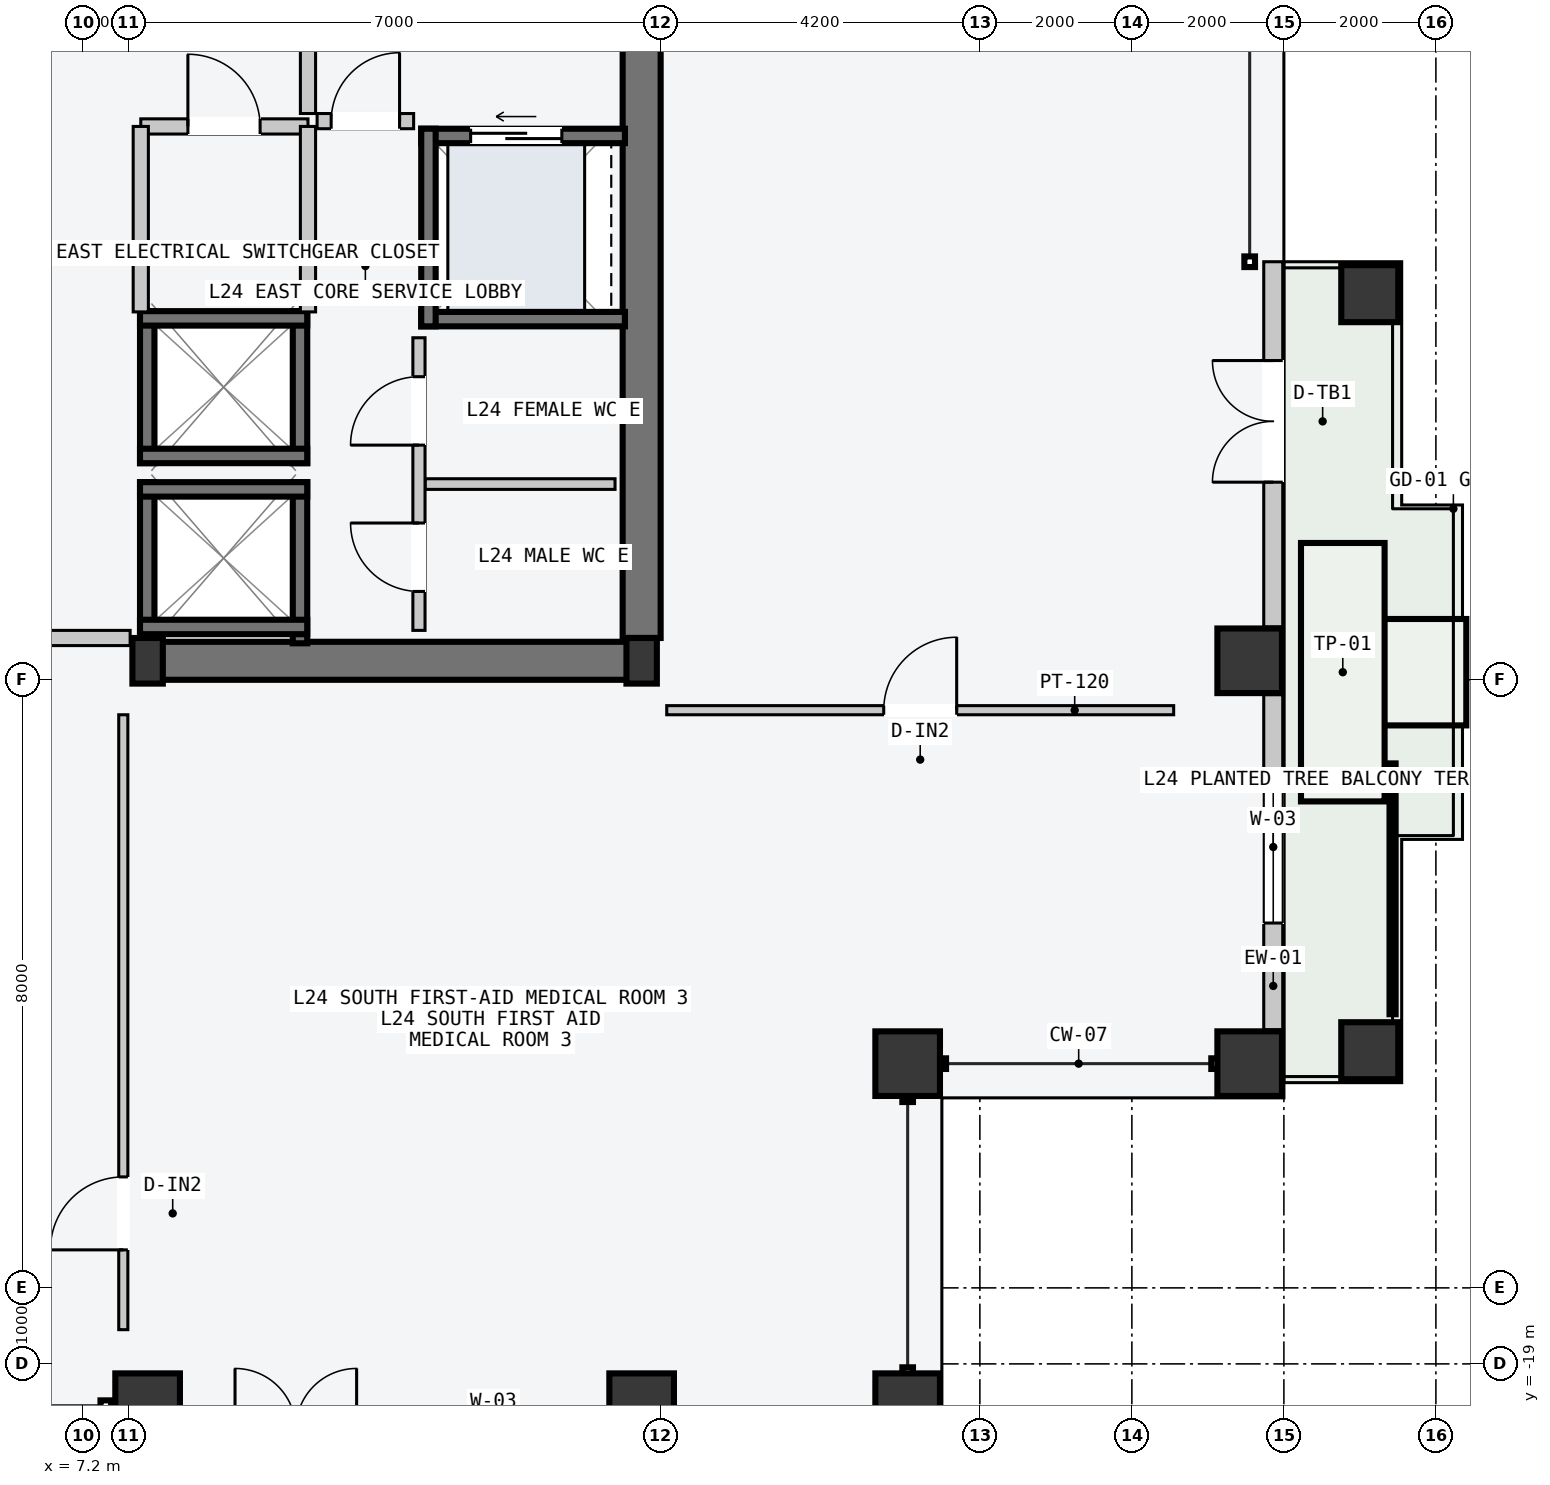
"""IFC4 building model, lengths in metres.
Left out: names, types, materials, properties, quantities, classifications, styles, units other than length and angle.
Written with IfcOpenShell. Run it as: python <this file> out.ifc"""

import sys

from ifc_helpers import new_model, si_unit, direction, frame, frame_2d, origin, origin_2d, place, context, subcontext, project, spatial, rectangle, hollow_rectangle, i_section, extrude, element, fill, save


model = new_model("IFC4")
c1 = context("Model", 3, precision=1e-05, world=origin(), true_north=direction((0.0, 1.0)))
c2 = subcontext(c1, "Body", "Model", "MODEL_VIEW")
j1 = project(units=[si_unit("LENGTHUNIT", "METRE"), si_unit("PLANEANGLEUNIT", "RADIAN")], contexts=[c1])
p1 = place(None, origin())
s1 = spatial("IfcSite", under=j1, at=p1, CompositionType="ELEMENT")
p2 = place(p1, origin())
s2 = spatial("IfcBuilding", under=s1, at=p2, CompositionType="ELEMENT")
p3 = place(p2, frame((0.0, 0.0, 95.4)))
s3 = spatial("IfcBuildingStorey", under=s2, at=p3, CompositionType="ELEMENT", Elevation=95.4)
p4 = place(p3, frame((8.07, -9.75, -0.2), z_axis=(0.0, 0.0, 1.0), x_axis=(1.0, 0.0, 0.0)))
e1 = element("IfcWall", 1, at=p4, inside=s3, PredefinedType="SHEAR", context=c2, shape_type="SweptSolid", body=[
    extrude(rectangle(XDim=6.46, YDim=0.5, at=frame_2d((3.23, 0.0))), origin(), (0.0, 0.0, 1.0), 3.6),
])
p5 = place(p3, frame((14.55, -9.45, -0.2), z_axis=(0.0, 0.0, 1.0), x_axis=(0.0, 1.0, 0.0)))
e2 = element("IfcWall", 2, at=p5, inside=s3, PredefinedType="SHEAR", context=c2, shape_type="SweptSolid", body=[
    extrude(rectangle(XDim=9.15, YDim=0.5, at=frame_2d((4.575, 0.0))), origin(), (0.0, 0.0, 1.0), 3.6),
])
for number, where, z_axis, x_axis in (
    (3, (8.05, -9.75, 0.0), (0.0, 0.0, 1.0), (1.0, 0.0, 0.0)),
    (4, (14.55, -9.75, 0.0), (0.0, 0.0, 1.0), (1.0, 0.0, 0.0)),
):
    element("IfcColumn", number, at=place(p3, frame(where, z_axis=z_axis, x_axis=x_axis)), inside=s3, PredefinedType="COLUMN", context=c2, shape_type="SweptSolid", body=[
        extrude(i_section(OverallWidth=0.4, OverallDepth=0.6, WebThickness=0.022, FlangeThickness=0.036, at=origin_2d()), origin(), (0.0, 0.0, 1.0), 3.6),
    ])
for number, where, z_axis, x_axis in (
    (5, (8.05, -19.55, 0.0), (0.0, 0.0, 1.0), (1.0, 0.0, 0.0)),
    (6, (14.55, -19.55, 0.0), (0.0, 0.0, 1.0), (1.0, 0.0, 0.0)),
    (7, (18.05, -19.55, 0.0), (0.0, 0.0, 1.0), (1.0, 0.0, 0.0)),
    (8, (22.55, -15.05, 0.0), (0.0, 0.0, 1.0), (0.0, 1.0, 0.0)),
    (9, (22.55, -9.75, 0.0), (0.0, 0.0, 1.0), (0.0, 1.0, 0.0)),
    (10, (18.05, -15.05, 0.0), (0.0, 0.0, 1.0), (1.0, 0.0, 0.0)),
):
    element("IfcColumn", number, at=place(p3, frame(where, z_axis=z_axis, x_axis=x_axis)), inside=s3, PredefinedType="COLUMN", context=c2, shape_type="SweptSolid", body=[
        extrude(hollow_rectangle(XDim=0.85, YDim=0.85, WallThickness=0.04, at=origin_2d()), origin(), (0.0, 0.0, 1.0), 3.6),
    ])
for number, where, z_axis, x_axis in (
    (11, (24.13, -14.88, -0.2), (0.0, 0.0, 1.0), (0.0, 1.0, 0.0)),
    (12, (24.13, -4.92, -0.2), (0.0, 0.0, 1.0), (0.0, 1.0, 0.0)),
):
    element("IfcColumn", number, at=place(p3, frame(where, z_axis=z_axis, x_axis=x_axis)), inside=s3, PredefinedType="COLUMN", context=c2, shape_type="SweptSolid", body=[
        extrude(hollow_rectangle(XDim=0.75, YDim=0.75, WallThickness=0.032, at=origin_2d()), origin(), (0.0, 0.0, 1.0), 3.8),
    ])
p6 = place(p3, frame((22.86, -14.605, 0.0), z_axis=(0.0, 0.0, 1.0), x_axis=(0.0, 1.0, 0.0)))
e13 = element("IfcWall", 13, at=p6, inside=s3, PredefinedType="STANDARD", context=c2, shape_type="SweptSolid", body=[
    extrude(rectangle(XDim=4.41, YDim=0.25, at=frame_2d((2.205, 0.0))), origin(), (0.0, 0.0, 1.0), 3.4),
])
p7 = place(p6, frame((1.405, 0.0, 0.85)))
e14 = element("IfcOpeningElement", 14, at=p7, cuts=e13, PredefinedType="OPENING", context=c2, shape_type="SweptSolid", body=[
    extrude(rectangle(XDim=2.0, YDim=2.1, at=frame_2d((1.0, 1.05))), frame((0.0, 0.135, 0.0), z_axis=(0.0, -1.0, 0.0), x_axis=(1.0, 0.0, 0.0)), (0.0, 0.0, 1.0), 0.27),
])
p8 = place(p3, frame((22.86, -9.305, 0.0), z_axis=(0.0, 0.0, 1.0), x_axis=(0.0, 1.0, 0.0)))
e15 = element("IfcWall", 15, at=p8, inside=s3, PredefinedType="STANDARD", context=c2, shape_type="SweptSolid", body=[
    extrude(rectangle(XDim=4.805, YDim=0.25, at=frame_2d((2.402, 0.0))), origin(), (0.0, 0.0, 1.0), 3.4),
])
p9 = place(p8, frame((1.905, 0.0, 0.0)))
e16 = element("IfcOpeningElement", 16, at=p9, cuts=e15, PredefinedType="OPENING", context=c2, shape_type="SweptSolid", body=[
    extrude(rectangle(XDim=1.6, YDim=2.2, at=frame_2d((0.8, 1.1))), frame((0.0, 0.135, 0.0), z_axis=(0.0, -1.0, 0.0), x_axis=(1.0, 0.0, 0.0)), (0.0, 0.0, 1.0), 0.27),
])
for number, where, z_axis, x_axis in (
    (17, (8.045, -9.52, -0.2), (0.0, 0.0, 1.0), (0.0, 1.0, 0.0)),
    (18, (10.055, -9.52, -0.2), (0.0, 0.0, 1.0), (0.0, 1.0, 0.0)),
):
    element("IfcWall", number, at=place(p3, frame(where, z_axis=z_axis, x_axis=x_axis)), inside=s3, PredefinedType="SOLIDWALL", context=c2, shape_type="SweptSolid", body=[
        extrude(rectangle(XDim=2.12, YDim=0.19, at=frame_2d((1.06, 0.0))), origin(), (0.0, 0.0, 1.0), 3.6),
    ])
for number, where, z_axis, x_axis in (
    (19, (7.95, -7.495, -0.2), (0.0, 0.0, 1.0), (1.0, 0.0, 0.0)),
    (20, (7.95, -9.305, -0.2), (0.0, 0.0, 1.0), (1.0, 0.0, 0.0)),
):
    element("IfcWall", number, at=place(p3, frame(where, z_axis=z_axis, x_axis=x_axis)), inside=s3, PredefinedType="SOLIDWALL", context=c2, shape_type="SweptSolid", body=[
        extrude(rectangle(XDim=2.2, YDim=0.19, at=frame_2d((1.1, 0.0))), origin(), (0.0, 0.0, 1.0), 3.6),
    ])
for number, where, z_axis, x_axis in (
    (21, (8.045, -7.15, -0.2), (0.0, 0.0, 1.0), (0.0, 1.0, 0.0)),
    (22, (10.055, -7.15, -0.2), (0.0, 0.0, 1.0), (0.0, 1.0, 0.0)),
):
    element("IfcWall", number, at=place(p3, frame(where, z_axis=z_axis, x_axis=x_axis)), inside=s3, PredefinedType="SOLIDWALL", context=c2, shape_type="SweptSolid", body=[
        extrude(rectangle(XDim=2.0, YDim=0.19, at=frame_2d((1.0, 0.0))), origin(), (0.0, 0.0, 1.0), 3.6),
    ])
for number, where, z_axis, x_axis in (
    (23, (7.95, -5.245, -0.2), (0.0, 0.0, 1.0), (1.0, 0.0, 0.0)),
    (24, (7.95, -7.055, -0.2), (0.0, 0.0, 1.0), (1.0, 0.0, 0.0)),
):
    element("IfcWall", number, at=place(p3, frame(where, z_axis=z_axis, x_axis=x_axis)), inside=s3, PredefinedType="SOLIDWALL", context=c2, shape_type="SweptSolid", body=[
        extrude(rectangle(XDim=2.2, YDim=0.19, at=frame_2d((1.1, 0.0))), origin(), (0.0, 0.0, 1.0), 3.6),
    ])
p10 = place(p3, frame((11.65, -2.845, -0.2), z_axis=(0.0, 0.0, 1.0), x_axis=(1.0, 0.0, 0.0)))
e25 = element("IfcWall", 25, at=p10, inside=s3, PredefinedType="SOLIDWALL", context=c2, shape_type="SweptSolid", body=[
    extrude(rectangle(XDim=2.68, YDim=0.19, at=frame_2d((1.34, 0.0))), origin(), (0.0, 0.0, 1.0), 3.6),
])
p11 = place(p10, frame((0.65, 0.0, 0.2)))
e26 = element("IfcOpeningElement", 26, at=p11, cuts=e25, PredefinedType="OPENING", context=c2, shape_type="SweptSolid", body=[
    extrude(rectangle(XDim=1.2, YDim=2.2, at=frame_2d((0.6, 1.1))), frame((0.0, 0.105, 0.0), z_axis=(0.0, -1.0, 0.0), x_axis=(1.0, 0.0, 0.0)), (0.0, 0.0, 1.0), 0.21),
])
p12 = place(p3, frame((11.65, -5.255, -0.2), z_axis=(0.0, 0.0, 1.0), x_axis=(1.0, 0.0, 0.0)))
e27 = element("IfcWall", 27, at=p12, inside=s3, PredefinedType="SOLIDWALL", context=c2, shape_type="SweptSolid", body=[
    extrude(rectangle(XDim=2.68, YDim=0.19, at=frame_2d((1.34, 0.0))), origin(), (0.0, 0.0, 1.0), 3.6),
])
p13 = place(p3, frame((11.745, -5.35, -0.2), z_axis=(0.0, 0.0, 1.0), x_axis=(0.0, 1.0, 0.0)))
e28 = element("IfcWall", 28, at=p13, inside=s3, PredefinedType="SOLIDWALL", context=c2, shape_type="SweptSolid", body=[
    extrude(rectangle(XDim=2.6, YDim=0.19, at=frame_2d((1.3, 0.0))), origin(), (0.0, 0.0, 1.0), 3.6),
])
p14 = place(p3, frame((6.02, -9.45, 0.0), z_axis=(0.0, 0.0, 1.0), x_axis=(1.0, 0.0, 0.0)))
e29 = element("IfcWall", 29, at=p14, inside=s3, PredefinedType="PARTITIONING", context=c2, shape_type="SweptSolid", body=[
    extrude(rectangle(XDim=1.8, YDim=0.2, at=frame_2d((0.9, 0.0))), origin(), (0.0, 0.0, 1.0), 3.4),
])
p15 = place(p3, frame((10.16, -2.55, 0.0), z_axis=(0.0, 0.0, 1.0), x_axis=(0.0, 1.0, 0.0)))
e30 = element("IfcWall", 30, at=p15, inside=s3, PredefinedType="PARTITIONING", context=c2, shape_type="SweptSolid", body=[
    extrude(rectangle(XDim=3.4, YDim=0.2, at=frame_2d((1.7, 0.0))), origin(), (0.0, 0.0, 1.0), 3.4),
])
p16 = place(p15, frame((1.3, 0.0, 0.0)))
e31 = element("IfcOpeningElement", 31, at=p16, cuts=e30, PredefinedType="OPENING", context=c2, shape_type="SweptSolid", body=[
    extrude(rectangle(XDim=1.1, YDim=2.15, at=frame_2d((0.55, 1.075))), frame((0.0, 0.11, 0.0), z_axis=(0.0, -1.0, 0.0), x_axis=(1.0, 0.0, 0.0)), (0.0, 0.0, 1.0), 0.22),
])
p17 = place(p3, frame((10.28, -2.65, 0.0), z_axis=(0.0, 0.0, 1.0), x_axis=(1.0, 0.0, 0.0)))
e32 = element("IfcWall", 32, at=p17, inside=s3, PredefinedType="PARTITIONING", context=c2, shape_type="SweptSolid", body=[
    extrude(rectangle(XDim=1.27, YDim=0.2, at=frame_2d((0.635, 0.0))), origin(), (0.0, 0.0, 1.0), 3.4),
])
p18 = place(p17, frame((0.185, 0.0, 0.0)))
e33 = element("IfcOpeningElement", 33, at=p18, cuts=e32, PredefinedType="OPENING", context=c2, shape_type="SweptSolid", body=[
    extrude(rectangle(XDim=0.9, YDim=2.15, at=frame_2d((0.45, 1.075))), frame((0.0, 0.11, 0.0), z_axis=(0.0, -1.0, 0.0), x_axis=(1.0, 0.0, 0.0)), (0.0, 0.0, 1.0), 0.22),
])
p19 = place(p3, frame((7.96, -2.72, 0.0), z_axis=(0.0, 0.0, 1.0), x_axis=(1.0, 0.0, 0.0)))
e34 = element("IfcWall", 34, at=p19, inside=s3, PredefinedType="PARTITIONING", context=c2, shape_type="SweptSolid", body=[
    extrude(rectangle(XDim=2.2, YDim=0.2, at=frame_2d((1.1, 0.0))), origin(), (0.0, 0.0, 1.0), 3.4),
])
p20 = place(p19, frame((0.62, 0.0, 0.0)))
e35 = element("IfcOpeningElement", 35, at=p20, cuts=e34, PredefinedType="OPENING", context=c2, shape_type="SweptSolid", body=[
    extrude(rectangle(XDim=0.95, YDim=2.1, at=frame_2d((0.475, 1.05))), frame((0.0, 0.11, 0.0), z_axis=(0.0, -1.0, 0.0), x_axis=(1.0, 0.0, 0.0)), (0.0, 0.0, 1.0), 0.22),
])
for number, where, z_axis, x_axis in (
    (36, (7.96, -5.16, 0.0), (0.0, 0.0, 1.0), (0.0, 1.0, 0.0)),
    (37, (10.16, -5.16, 0.0), (0.0, 0.0, 1.0), (0.0, 1.0, 0.0)),
):
    element("IfcWall", number, at=place(p3, frame(where, z_axis=z_axis, x_axis=x_axis)), inside=s3, PredefinedType="PARTITIONING", context=c2, shape_type="SweptSolid", body=[
        extrude(rectangle(XDim=2.44, YDim=0.2, at=frame_2d((1.22, 0.0))), origin(), (0.0, 0.0, 1.0), 3.4),
    ])
p21 = place(p3, frame((11.7, -7.425, 0.0), z_axis=(0.0, 0.0, 1.0), x_axis=(1.0, 0.0, 0.0)))
e38 = element("IfcWall", 38, at=p21, inside=s3, PredefinedType="PARTITIONING", context=c2, shape_type="SweptSolid", body=[
    extrude(rectangle(XDim=2.5, YDim=0.14, at=frame_2d((1.25, 0.0))), origin(), (0.0, 0.0, 1.0), 3.4),
])
p22 = place(p3, frame((11.62, -9.35, 0.0), z_axis=(0.0, 0.0, 1.0), x_axis=(0.0, 1.0, 0.0)))
e39 = element("IfcWall", 39, at=p22, inside=s3, PredefinedType="PARTITIONING", context=c2, shape_type="SweptSolid", body=[
    extrude(rectangle(XDim=3.85, YDim=0.16, at=frame_2d((1.925, 0.0))), origin(), (0.0, 0.0, 1.0), 3.4),
])
p23 = place(p22, frame((0.512, 0.0, 0.0)))
e40 = element("IfcOpeningElement", 40, at=p23, cuts=e39, PredefinedType="OPENING", context=c2, shape_type="SweptSolid", body=[
    extrude(rectangle(XDim=0.9, YDim=2.15, at=frame_2d((0.45, 1.075))), frame((0.0, 0.09, 0.0), z_axis=(0.0, -1.0, 0.0), x_axis=(1.0, 0.0, 0.0)), (0.0, 0.0, 1.0), 0.18),
])
p24 = place(p22, frame((2.438, 0.0, 0.0)))
e41 = element("IfcOpeningElement", 41, at=p24, cuts=e39, PredefinedType="OPENING", context=c2, shape_type="SweptSolid", body=[
    extrude(rectangle(XDim=0.9, YDim=2.15, at=frame_2d((0.45, 1.075))), frame((0.0, 0.09, 0.0), z_axis=(0.0, -1.0, 0.0), x_axis=(1.0, 0.0, 0.0)), (0.0, 0.0, 1.0), 0.18),
])
p25 = place(p3, frame((7.73, -18.55, 0.0), z_axis=(0.0, 0.0, 1.0), x_axis=(0.0, 1.0, 0.0)))
e42 = element("IfcWall", 42, at=p25, inside=s3, PredefinedType="PARTITIONING", context=c2, shape_type="SweptSolid", body=[
    extrude(rectangle(XDim=8.09, YDim=0.12, at=frame_2d((4.045, 0.0))), origin(), (0.0, 0.0, 1.0), 3.4),
])
p26 = place(p25, frame((1.05, 0.0, 0.0)))
e43 = element("IfcOpeningElement", 43, at=p26, cuts=e42, PredefinedType="OPENING", context=c2, shape_type="SweptSolid", body=[
    extrude(rectangle(XDim=0.96, YDim=2.18, at=frame_2d((0.48, 1.09))), frame((0.0, 0.07, 0.0), z_axis=(0.0, -1.0, 0.0), x_axis=(1.0, 0.0, 0.0)), (0.0, 0.0, 1.0), 0.14),
])
p27 = place(p3, frame((14.88, -10.4, 0.0), z_axis=(0.0, 0.0, 1.0), x_axis=(1.0, 0.0, 0.0)))
e44 = element("IfcWall", 44, at=p27, inside=s3, PredefinedType="PARTITIONING", context=c2, shape_type="SweptSolid", body=[
    extrude(rectangle(XDim=6.67, YDim=0.12, at=frame_2d((3.335, 0.0))), origin(), (0.0, 0.0, 1.0), 3.4),
])
p28 = place(p27, frame((2.855, 0.0, 0.0)))
e45 = element("IfcOpeningElement", 45, at=p28, cuts=e44, PredefinedType="OPENING", context=c2, shape_type="SweptSolid", body=[
    extrude(rectangle(XDim=0.96, YDim=2.18, at=frame_2d((0.48, 1.09))), frame((0.0, 0.07, 0.0), z_axis=(0.0, -1.0, 0.0), x_axis=(1.0, 0.0, 0.0)), (0.0, 0.0, 1.0), 0.14),
])
p29 = place(p7, origin())
e46 = element("IfcWindow", 46, at=p29, inside=s3, PartitioningType="SINGLE_PANEL", PredefinedType="WINDOW", context=c2, shape_type="SweptSolid", body=[
    extrude(rectangle(XDim=2.0, YDim=2.1, at=frame_2d((1.0, 1.05))), frame((0.0, 0.03, 0.0), z_axis=(0.0, -1.0, 0.0), x_axis=(1.0, 0.0, 0.0)), (0.0, 0.0, 1.0), 0.06),
])
fill(e14, e46)
p30 = place(p9, origin())
e47 = element("IfcDoor", 47, at=p30, inside=s3, OperationType="DOUBLE_DOOR_SINGLE_SWING", PredefinedType="DOOR", context=c2, shape_type="SweptSolid", body=[
    extrude(rectangle(XDim=1.6, YDim=2.2, at=frame_2d((0.8, 1.1))), frame((0.0, 0.025, 0.0), z_axis=(0.0, -1.0, 0.0), x_axis=(1.0, 0.0, 0.0)), (0.0, 0.0, 1.0), 0.05),
])
fill(e16, e47)
p31 = place(p11, origin())
e48 = element("IfcDoor", 48, at=p31, inside=s3, OperationType="SLIDING_TO_LEFT", PredefinedType="DOOR", context=c2, shape_type="SweptSolid", body=[
    extrude(rectangle(XDim=1.2, YDim=2.2, at=frame_2d((0.6, 1.1))), frame((0.0, 0.025, 0.0), z_axis=(0.0, -1.0, 0.0), x_axis=(1.0, 0.0, 0.0)), (0.0, 0.0, 1.0), 0.05),
])
fill(e26, e48)
p32 = place(p18, origin())
e49 = element("IfcDoor", 49, at=p32, inside=s3, OperationType="SINGLE_SWING_RIGHT", PredefinedType="DOOR", context=c2, shape_type="SweptSolid", body=[
    extrude(rectangle(XDim=0.9, YDim=2.15, at=frame_2d((0.45, 1.075))), frame((0.0, 0.025, 0.0), z_axis=(0.0, -1.0, 0.0), x_axis=(1.0, 0.0, 0.0)), (0.0, 0.0, 1.0), 0.05),
])
fill(e33, e49)
p33 = place(p20, origin())
e50 = element("IfcDoor", 50, at=p33, inside=s3, OperationType="SINGLE_SWING_LEFT", PredefinedType="DOOR", context=c2, shape_type="SweptSolid", body=[
    extrude(rectangle(XDim=0.95, YDim=2.1, at=frame_2d((0.475, 1.05))), frame((0.0, 0.025, 0.0), z_axis=(0.0, -1.0, 0.0), x_axis=(1.0, 0.0, 0.0)), (0.0, 0.0, 1.0), 0.05),
])
fill(e35, e50)
p34 = place(p23, origin())
e51 = element("IfcDoor", 51, at=p34, inside=s3, OperationType="SINGLE_SWING_RIGHT", PredefinedType="DOOR", context=c2, shape_type="SweptSolid", body=[
    extrude(rectangle(XDim=0.9, YDim=2.15, at=frame_2d((0.45, 1.075))), frame((0.0, 0.025, 0.0), z_axis=(0.0, -1.0, 0.0), x_axis=(1.0, 0.0, 0.0)), (0.0, 0.0, 1.0), 0.05),
])
fill(e40, e51)
p35 = place(p24, origin())
e52 = element("IfcDoor", 52, at=p35, inside=s3, OperationType="SINGLE_SWING_LEFT", PredefinedType="DOOR", context=c2, shape_type="SweptSolid", body=[
    extrude(rectangle(XDim=0.9, YDim=2.15, at=frame_2d((0.45, 1.075))), frame((0.0, 0.025, 0.0), z_axis=(0.0, -1.0, 0.0), x_axis=(1.0, 0.0, 0.0)), (0.0, 0.0, 1.0), 0.05),
])
fill(e41, e52)
p36 = place(p26, origin())
e53 = element("IfcDoor", 53, at=p36, inside=s3, OperationType="SINGLE_SWING_LEFT", PredefinedType="DOOR", context=c2, shape_type="SweptSolid", body=[
    extrude(rectangle(XDim=0.96, YDim=2.18, at=frame_2d((0.48, 1.09))), frame((0.0, 0.025, 0.0), z_axis=(0.0, -1.0, 0.0), x_axis=(1.0, 0.0, 0.0)), (0.0, 0.0, 1.0), 0.05),
])
fill(e43, e53)
p37 = place(p28, origin())
e54 = element("IfcDoor", 54, at=p37, inside=s3, OperationType="SINGLE_SWING_RIGHT", PredefinedType="DOOR", context=c2, shape_type="SweptSolid", body=[
    extrude(rectangle(XDim=0.96, YDim=2.18, at=frame_2d((0.48, 1.09))), frame((0.0, 0.025, 0.0), z_axis=(0.0, -1.0, 0.0), x_axis=(1.0, 0.0, 0.0)), (0.0, 0.0, 1.0), 0.05),
])
fill(e45, e54)
save(model, sys.argv[1])
